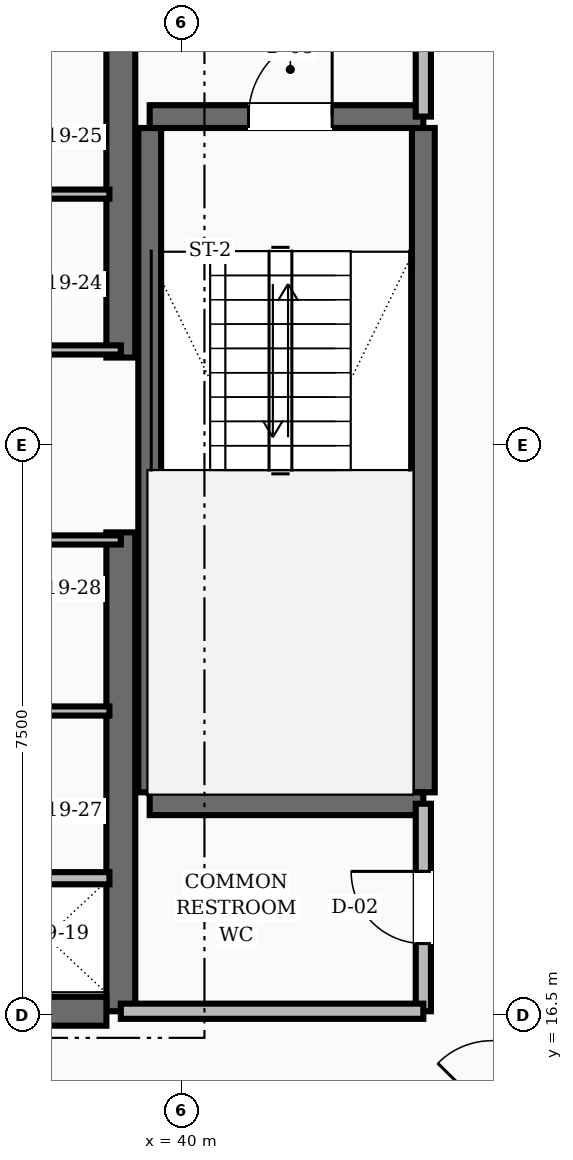
"""IFC4 building model, lengths in metres.
Left out: names, types, materials, properties, quantities, classifications, styles, units other than length and angle.
Written with IfcOpenShell. Run it as: python <this file> out.ifc"""

import sys

from ifc_helpers import new_model, si_unit, direction, frame, frame_2d, origin, place, context, subcontext, project, spatial, rectangle, extrude, element, fill, save


model = new_model("IFC4")
c1 = context("Model", 3, precision=1e-05, world=origin(), true_north=direction((0.0, 1.0)))
c2 = subcontext(c1, "Body", "Model", "MODEL_VIEW")
j1 = project(units=[si_unit("LENGTHUNIT", "METRE"), si_unit("PLANEANGLEUNIT", "RADIAN")], contexts=[c1])
p1 = place(None, origin())
s1 = spatial("IfcSite", under=j1, at=p1, CompositionType="ELEMENT")
p2 = place(p1, origin())
s2 = spatial("IfcBuilding", under=s1, at=p2, CompositionType="ELEMENT")
p3 = place(p2, frame((0.0, 0.0, 77.2)))
s3 = spatial("IfcBuildingStorey", under=s2, at=p3, CompositionType="ELEMENT", Elevation=77.2)
for number, where, z_axis, x_axis in (
    (1, (39.2, 16.55, 0.0), (0.0, 0.0, 1.0), (0.0, 1.0, 0.0)),
    (2, (39.2, 25.15, 0.0), (0.0, 0.0, 1.0), (0.0, 1.0, 0.0)),
):
    element("IfcWall", number, at=place(p3, frame(where, z_axis=z_axis, x_axis=x_axis)), inside=s3, PredefinedType="SHEAR", context=c2, shape_type="SweptSolid", body=[
        extrude(rectangle(XDim=6.3, YDim=0.38, at=frame_2d((3.15, 0.0))), origin(), (0.0, 0.0, 1.0), 3.6),
    ])
p4 = place(p3, frame((35.8, 16.55, 0.0), z_axis=(0.0, 0.0, 1.0), x_axis=(1.0, 0.0, 0.0)))
e3 = element("IfcWall", 3, at=p4, inside=s3, PredefinedType="SHEAR", context=c2, shape_type="SweptSolid", body=[
    extrude(rectangle(XDim=3.21, YDim=0.38, at=frame_2d((1.605, 0.0))), origin(), (0.0, 0.0, 1.0), 3.6),
])
p5 = place(p4, frame((0.3, 0.0, 0.0)))
e4 = element("IfcOpeningElement", 4, at=p5, cuts=e3, PredefinedType="OPENING", context=c2, shape_type="SweptSolid", body=[
    extrude(rectangle(XDim=1.1, YDim=2.1, at=frame_2d((0.55, 1.05))), frame((0.0, 0.2, 0.0), z_axis=(0.0, -1.0, 0.0), x_axis=(1.0, 0.0, 0.0)), (0.0, 0.0, 1.0), 0.4),
])
for number, where, z_axis, x_axis in (
    (5, (43.18, 19.43, 0.0), (0.0, 0.0, 1.0), (0.0, 1.0, 0.0)),
    (6, (39.58, 19.43, 0.0), (0.0, 0.0, 1.0), (0.0, 1.0, 0.0)),
):
    element("IfcWall", number, at=place(p3, frame(where, z_axis=z_axis, x_axis=x_axis)), inside=s3, PredefinedType="SHEAR", context=c2, shape_type="SweptSolid", body=[
        extrude(rectangle(XDim=8.74, YDim=0.3, at=frame_2d((4.37, 0.0))), origin(), (0.0, 0.0, 1.0), 3.6),
    ])
p6 = place(p3, frame((39.58, 19.28, 0.0), z_axis=(0.0, 0.0, 1.0), x_axis=(1.0, 0.0, 0.0)))
e7 = element("IfcWall", 7, at=p6, inside=s3, PredefinedType="SHEAR", context=c2, shape_type="SweptSolid", body=[
    extrude(rectangle(XDim=3.6, YDim=0.3, at=frame_2d((1.8, 0.0))), origin(), (0.0, 0.0, 1.0), 3.6),
])
p7 = place(p3, frame((39.58, 28.32, 0.0), z_axis=(0.0, 0.0, 1.0), x_axis=(1.0, 0.0, 0.0)))
e8 = element("IfcWall", 8, at=p7, inside=s3, PredefinedType="SHEAR", context=c2, shape_type="SweptSolid", body=[
    extrude(rectangle(XDim=3.6, YDim=0.3, at=frame_2d((1.8, 0.0))), origin(), (0.0, 0.0, 1.0), 3.6),
])
p8 = place(p7, frame((1.3, 0.0, 0.0)))
e9 = element("IfcOpeningElement", 9, at=p8, cuts=e8, PredefinedType="OPENING", context=c2, shape_type="SweptSolid", body=[
    extrude(rectangle(XDim=1.1, YDim=2.1, at=frame_2d((0.55, 1.05))), frame((0.0, 0.16, 0.0), z_axis=(0.0, -1.0, 0.0), x_axis=(1.0, 0.0, 0.0)), (0.0, 0.0, 1.0), 0.32),
])
p9 = place(p3, frame((43.18, 28.32, 0.0), z_axis=(0.0, 0.0, 1.0), x_axis=(0.0, 1.0, 0.0)))
e10 = element("IfcWall", 10, at=p9, inside=s3, PredefinedType="SOLIDWALL", context=c2, shape_type="SweptSolid", body=[
    extrude(rectangle(XDim=3.13, YDim=0.2, at=frame_2d((1.565, 0.0))), origin(), (0.0, 0.0, 1.0), 2.71),
])
p10 = place(p9, frame((1.015, 0.0, 0.0)))
e11 = element("IfcOpeningElement", 11, at=p10, cuts=e10, PredefinedType="OPENING", context=c2, shape_type="SweptSolid", body=[
    extrude(rectangle(XDim=1.1, YDim=2.1, at=frame_2d((0.55, 1.05))), frame((0.0, 0.11, 0.0), z_axis=(0.0, -1.0, 0.0), x_axis=(1.0, 0.0, 0.0)), (0.0, 0.0, 1.0), 0.22),
])
p11 = place(p3, frame((43.18, 16.55, 0.0), z_axis=(0.0, 0.0, 1.0), x_axis=(0.0, 1.0, 0.0)))
e12 = element("IfcWall", 12, at=p11, inside=s3, PredefinedType="SOLIDWALL", context=c2, shape_type="SweptSolid", body=[
    extrude(rectangle(XDim=2.73, YDim=0.2, at=frame_2d((1.365, 0.0))), origin(), (0.0, 0.0, 1.0), 2.71),
])
p12 = place(p11, frame((0.89, 0.0, 0.0)))
e13 = element("IfcOpeningElement", 13, at=p12, cuts=e12, PredefinedType="OPENING", context=c2, shape_type="SweptSolid", body=[
    extrude(rectangle(XDim=0.95, YDim=2.1, at=frame_2d((0.475, 1.05))), frame((0.0, 0.11, 0.0), z_axis=(0.0, -1.0, 0.0), x_axis=(1.0, 0.0, 0.0)), (0.0, 0.0, 1.0), 0.22),
])
p13 = place(p3, frame((39.2, 16.55, 0.0), z_axis=(0.0, 0.0, 1.0), x_axis=(1.0, 0.0, 0.0)))
e14 = element("IfcWall", 14, at=p13, inside=s3, PredefinedType="SOLIDWALL", context=c2, shape_type="SweptSolid", body=[
    extrude(rectangle(XDim=3.98, YDim=0.2, at=frame_2d((1.99, 0.0))), origin(), (0.0, 0.0, 1.0), 2.71),
])
p14 = place(p3, frame((37.4, 18.3, 0.0), z_axis=(0.0, 0.0, 1.0), x_axis=(1.0, 0.0, 0.0)))
e15 = element("IfcWall", 15, at=p14, inside=s3, PredefinedType="SOLIDWALL", context=c2, shape_type="SweptSolid", body=[
    extrude(rectangle(XDim=1.65, YDim=0.16, at=frame_2d((0.825, 0.0))), origin(), (0.0, 0.0, 1.0), 2.71),
])
for number, where, z_axis, x_axis in (
    (16, (37.4, 25.25, 0.0), (0.0, 0.0, 1.0), (1.0, 0.0, 0.0)),
    (17, (37.4, 22.75, 0.0), (0.0, 0.0, 1.0), (1.0, 0.0, 0.0)),
):
    element("IfcWall", number, at=place(p3, frame(where, z_axis=z_axis, x_axis=x_axis)), inside=s3, PredefinedType="PARTITIONING", context=c2, shape_type="SweptSolid", body=[
        extrude(rectangle(XDim=1.8, YDim=0.12, at=frame_2d((0.9, 0.0))), origin(), (0.0, 0.0, 1.0), 2.71),
    ])
for number, where, z_axis, x_axis in (
    (18, (37.4, 27.3, 0.0), (0.0, 0.0, 1.0), (1.0, 0.0, 0.0)),
    (19, (37.4, 20.5, 0.0), (0.0, 0.0, 1.0), (1.0, 0.0, 0.0)),
):
    element("IfcWall", number, at=place(p3, frame(where, z_axis=z_axis, x_axis=x_axis)), inside=s3, PredefinedType="PARTITIONING", context=c2, shape_type="SweptSolid", body=[
        extrude(rectangle(XDim=1.65, YDim=0.12, at=frame_2d((0.825, 0.0))), origin(), (0.0, 0.0, 1.0), 2.71),
    ])
p15 = place(p3, frame((43.428, 14.501, 0.0), z_axis=(0.0, 0.0, 1.0), x_axis=(0.702569520063, 0.711615113301, 0.0)))
e20 = element("IfcWall", 20, at=p15, inside=s3, PredefinedType="SOLIDWALL", context=c2, shape_type="SweptSolid", body=[
    extrude(rectangle(XDim=2.861, YDim=0.16, at=frame_2d((1.43, 0.0))), origin(), (0.0, 0.0, 1.0), 2.71),
])
p16 = place(p15, frame((0.93, 0.0, 0.0)))
e21 = element("IfcOpeningElement", 21, at=p16, cuts=e20, PredefinedType="OPENING", context=c2, shape_type="SweptSolid", body=[
    extrude(rectangle(XDim=1.0, YDim=2.1, at=frame_2d((0.5, 1.05))), frame((0.0, 0.09, 0.0), z_axis=(0.0, -1.0, 0.0), x_axis=(1.0, 0.0, 0.0)), (0.0, 0.0, 1.0), 0.18),
])
p17 = place(p8, origin())
e22 = element("IfcDoor", 22, at=p17, inside=s3, OperationType="SINGLE_SWING_RIGHT", PredefinedType="DOOR", context=c2, shape_type="SweptSolid", body=[
    extrude(rectangle(XDim=1.1, YDim=2.1, at=frame_2d((0.55, 1.05))), frame((0.0, 0.025, 0.0), z_axis=(0.0, -1.0, 0.0), x_axis=(1.0, 0.0, 0.0)), (0.0, 0.0, 1.0), 0.05),
])
fill(e9, e22)
p18 = place(p12, origin())
e23 = element("IfcDoor", 23, at=p18, inside=s3, OperationType="SINGLE_SWING_RIGHT", PredefinedType="DOOR", context=c2, shape_type="SweptSolid", body=[
    extrude(rectangle(XDim=0.95, YDim=2.1, at=frame_2d((0.475, 1.05))), frame((0.0, 0.025, 0.0), z_axis=(0.0, -1.0, 0.0), x_axis=(1.0, 0.0, 0.0)), (0.0, 0.0, 1.0), 0.05),
])
fill(e13, e23)
p19 = place(p16, origin())
e24 = element("IfcDoor", 24, at=p19, inside=s3, OperationType="SINGLE_SWING_LEFT", PredefinedType="DOOR", context=c2, shape_type="SweptSolid", body=[
    extrude(rectangle(XDim=1.0, YDim=2.1, at=frame_2d((0.5, 1.05))), frame((0.0, 0.025, 0.0), z_axis=(0.0, -1.0, 0.0), x_axis=(1.0, 0.0, 0.0)), (0.0, 0.0, 1.0), 0.05),
])
fill(e21, e24)
save(model, sys.argv[1])
